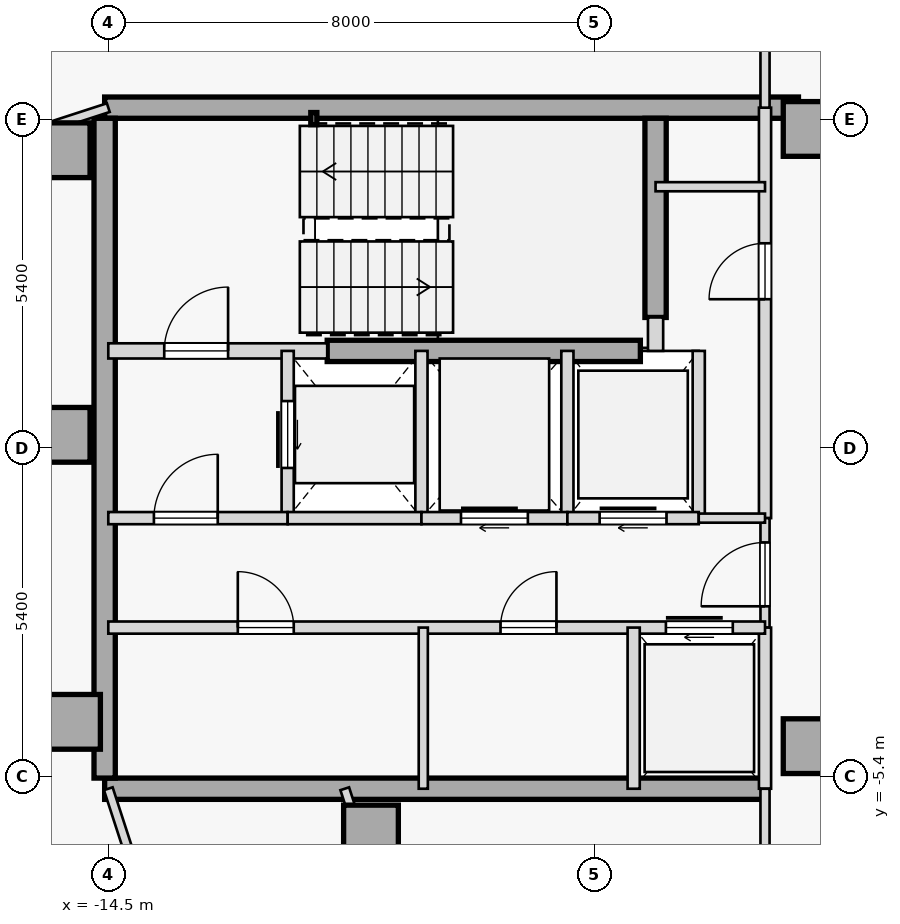
"""IFC4 building model, lengths in metres.
Left out: names, types, materials, properties, quantities, classifications, styles, units other than length and angle.
Written with IfcOpenShell. Run it as: python <this file> out.ifc"""

import sys

from ifc_helpers import new_model, si_unit, direction, frame, frame_2d, origin, origin_2d, place, context, subcontext, project, spatial, rectangle, hollow_rectangle, extrude, element, fill, save


model = new_model("IFC4")
c1 = context("Model", 3, precision=1e-05, world=origin(), true_north=direction((0.0, 1.0)))
c2 = subcontext(c1, "Body", "Model", "MODEL_VIEW")
j1 = project(units=[si_unit("LENGTHUNIT", "METRE"), si_unit("PLANEANGLEUNIT", "RADIAN")], contexts=[c1])
p1 = place(None, origin())
s1 = spatial("IfcSite", under=j1, at=p1, CompositionType="ELEMENT")
p2 = place(p1, origin())
s2 = spatial("IfcBuilding", under=s1, at=p2, CompositionType="ELEMENT")
p3 = place(p2, frame((0.0, 0.0, 241.05)))
s3 = spatial("IfcBuildingStorey", under=s2, at=p3, CompositionType="ELEMENT", Elevation=241.05)
for number, where, z_axis, x_axis in (
    (1, (-15.25, 4.9, 0.0), (0.0, 0.0, 1.0), (1.0, 0.0, 0.0)),
    (2, (-15.25, 0.22, 0.0), (0.0, 0.0, 1.0), (1.0, 0.0, 0.0)),
    (3, (-15.08, -4.5, 0.0), (0.0, 0.0, 1.0), (1.0, 0.0, 0.0)),
    (4, (-10.18, -6.32, 0.0), (0.0, 0.0, 1.0), (1.0, 0.0, 0.0)),
    (5, (-2.95, -4.9, 0.0), (0.0, 0.0, 1.0), (1.0, 0.0, 0.0)),
    (6, (-2.95, 5.25, 0.0), (0.0, 0.0, 1.0), (1.0, 0.0, 0.0)),
):
    element("IfcColumn", number, at=place(p3, frame(where, z_axis=z_axis, x_axis=x_axis)), inside=s3, PredefinedType="COLUMN", context=c2, shape_type="SweptSolid", body=[
        extrude(rectangle(XDim=0.9, YDim=0.9, at=origin_2d()), origin(), (0.0, 0.0, 1.0), 3.35),
    ])
p4 = place(p3, frame((-14.56, 5.6, 0.0), z_axis=(0.0, 0.0, 1.0), x_axis=(1.0, 0.0, 0.0)))
e7 = element("IfcWall", 7, at=p4, inside=s3, PredefinedType="SHEAR", context=c2, shape_type="SweptSolid", body=[
    extrude(rectangle(XDim=11.41, YDim=0.35, at=frame_2d((5.705, 0.0))), origin(), (0.0, 0.0, 1.0), 3.125),
])
p5 = place(p3, frame((-14.56, -5.6, 0.0), z_axis=(0.0, 0.0, 1.0), x_axis=(1.0, 0.0, 0.0)))
e8 = element("IfcWall", 8, at=p5, inside=s3, PredefinedType="SHEAR", context=c2, shape_type="SweptSolid", body=[
    extrude(rectangle(XDim=10.86, YDim=0.35, at=frame_2d((5.43, 0.0))), origin(), (0.0, 0.0, 1.0), 3.125),
])
p6 = place(p3, frame((-14.56, -5.425, 0.0), z_axis=(0.0, 0.0, 1.0), x_axis=(0.0, 1.0, 0.0)))
e9 = element("IfcWall", 9, at=p6, inside=s3, PredefinedType="SHEAR", context=c2, shape_type="SweptSolid", body=[
    extrude(rectangle(XDim=10.85, YDim=0.35, at=frame_2d((5.425, 0.0))), origin(), (0.0, 0.0, 1.0), 3.125),
])
p7 = place(p3, frame((-5.5, 2.15, 0.0), z_axis=(0.0, 0.0, 1.0), x_axis=(0.0, 1.0, 0.0)))
e10 = element("IfcWall", 10, at=p7, inside=s3, PredefinedType="SHEAR", context=c2, shape_type="SweptSolid", body=[
    extrude(rectangle(XDim=3.275, YDim=0.35, at=frame_2d((1.638, 0.0))), origin(), (0.0, 0.0, 1.0), 3.125),
])
p8 = place(p3, frame((-10.9, 1.6, 0.0), z_axis=(0.0, 0.0, 1.0), x_axis=(1.0, 0.0, 0.0)))
e11 = element("IfcWall", 11, at=p8, inside=s3, PredefinedType="SHEAR", context=c2, shape_type="SweptSolid", body=[
    extrude(rectangle(XDim=5.15, YDim=0.35, at=frame_2d((2.575, 0.0))), origin(), (0.0, 0.0, 1.0), 3.125),
])
p9 = place(p3, frame((-11.12, 5.42, 0.0), z_axis=(0.0, 0.0, 1.0), x_axis=(1.0, 0.0, 0.0)))
e12 = element("IfcColumn", 12, at=p9, inside=s3, PredefinedType="COLUMN", context=c2, shape_type="SweptSolid", body=[
    extrude(hollow_rectangle(XDim=0.1, YDim=0.2, WallThickness=0.008, at=origin_2d()), origin(), (0.0, 0.0, 1.0), 3.35),
])
p10 = place(p3, frame((-14.5, 1.6, 0.0), z_axis=(0.0, 0.0, 1.0), x_axis=(1.0, 0.0, 0.0)))
e13 = element("IfcWall", 13, at=p10, inside=s3, PredefinedType="STANDARD", context=c2, shape_type="SweptSolid", body=[
    extrude(rectangle(XDim=3.6, YDim=0.25, at=frame_2d((1.8, 0.0))), origin(), (0.0, 0.0, 1.0), 3.125),
])
p11 = place(p10, frame((0.92, 0.0, 0.0)))
e14 = element("IfcOpeningElement", 14, at=p11, cuts=e13, PredefinedType="OPENING", context=c2, shape_type="SweptSolid", body=[
    extrude(rectangle(XDim=1.05, YDim=2.15, at=frame_2d((0.525, 1.075))), frame((0.0, 0.135, 0.0), z_axis=(0.0, -1.0, 0.0), x_axis=(1.0, 0.0, 0.0)), (0.0, 0.0, 1.0), 0.27),
])
p12 = place(p3, frame((-5.5, 1.6, 0.0), z_axis=(0.0, 0.0, 1.0), x_axis=(0.0, 1.0, 0.0)))
e15 = element("IfcWall", 15, at=p12, inside=s3, PredefinedType="STANDARD", context=c2, shape_type="SweptSolid", body=[
    extrude(rectangle(XDim=0.55, YDim=0.25, at=frame_2d((0.275, 0.0))), origin(), (0.0, 0.0, 1.0), 3.125),
])
p13 = place(p3, frame((-3.7, -1.15, 0.0), z_axis=(0.0, 0.0, 1.0), x_axis=(0.0, 1.0, 0.0)))
e16 = element("IfcWall", 16, at=p13, inside=s3, PredefinedType="STANDARD", context=c2, shape_type="SweptSolid", body=[
    extrude(rectangle(XDim=6.75, YDim=0.2, at=frame_2d((3.375, 0.0))), origin(), (0.0, 0.0, 1.0), 3.125),
])
p14 = place(p13, frame((3.6, 0.0, 0.0)))
e17 = element("IfcOpeningElement", 17, at=p14, cuts=e16, PredefinedType="OPENING", context=c2, shape_type="SweptSolid", body=[
    extrude(rectangle(XDim=0.92, YDim=2.15, at=frame_2d((0.46, 1.075))), frame((0.0, 0.11, 0.0), z_axis=(0.0, -1.0, 0.0), x_axis=(1.0, 0.0, 0.0)), (0.0, 0.0, 1.0), 0.22),
])
p15 = place(p3, frame((-3.7, -2.95, 0.0), z_axis=(0.0, 0.0, 1.0), x_axis=(0.0, 1.0, 0.0)))
e18 = element("IfcWall", 18, at=p15, inside=s3, PredefinedType="PARTITIONING", context=c2, shape_type="SweptSolid", body=[
    extrude(rectangle(XDim=1.8, YDim=0.15, at=frame_2d((0.9, 0.0))), origin(), (0.0, 0.0, 1.0), 3.125),
])
p16 = place(p15, frame((0.35, 0.0, 0.0)))
e19 = element("IfcOpeningElement", 19, at=p16, cuts=e18, PredefinedType="OPENING", context=c2, shape_type="SweptSolid", body=[
    extrude(rectangle(XDim=1.05, YDim=2.18, at=frame_2d((0.525, 1.09))), frame((0.0, 0.085, 0.0), z_axis=(0.0, -1.0, 0.0), x_axis=(1.0, 0.0, 0.0)), (0.0, 0.0, 1.0), 0.17),
])
p17 = place(p3, frame((-3.7, -5.6, 0.0), z_axis=(0.0, 0.0, 1.0), x_axis=(0.0, 1.0, 0.0)))
e20 = element("IfcWall", 20, at=p17, inside=s3, PredefinedType="STANDARD", context=c2, shape_type="SweptSolid", body=[
    extrude(rectangle(XDim=2.65, YDim=0.2, at=frame_2d((1.325, 0.0))), origin(), (0.0, 0.0, 1.0), 3.125),
])
p18 = place(p3, frame((-11.55, -1.15, 0.0), z_axis=(0.0, 0.0, 1.0), x_axis=(0.0, 1.0, 0.0)))
e21 = element("IfcWall", 21, at=p18, inside=s3, PredefinedType="STANDARD", context=c2, shape_type="SweptSolid", body=[
    extrude(rectangle(XDim=2.75, YDim=0.2, at=frame_2d((1.375, 0.0))), origin(), (0.0, 0.0, 1.0), 3.125),
])
p19 = place(p18, frame((0.825, 0.0, 0.0)))
e22 = element("IfcOpeningElement", 22, at=p19, cuts=e21, PredefinedType="OPENING", context=c2, shape_type="SweptSolid", body=[
    extrude(rectangle(XDim=1.1, YDim=2.15, at=frame_2d((0.55, 1.075))), frame((0.0, 0.11, 0.0), z_axis=(0.0, -1.0, 0.0), x_axis=(1.0, 0.0, 0.0)), (0.0, 0.0, 1.0), 0.22),
])
p20 = place(p3, frame((-9.35, -1.15, 0.0), z_axis=(0.0, 0.0, 1.0), x_axis=(0.0, 1.0, 0.0)))
e23 = element("IfcWall", 23, at=p20, inside=s3, PredefinedType="STANDARD", context=c2, shape_type="SweptSolid", body=[
    extrude(rectangle(XDim=2.75, YDim=0.2, at=frame_2d((1.375, 0.0))), origin(), (0.0, 0.0, 1.0), 3.125),
])
p21 = place(p3, frame((-14.5, -1.15, 0.0), z_axis=(0.0, 0.0, 1.0), x_axis=(1.0, 0.0, 0.0)))
e24 = element("IfcWall", 24, at=p21, inside=s3, PredefinedType="STANDARD", context=c2, shape_type="SweptSolid", body=[
    extrude(rectangle(XDim=2.95, YDim=0.2, at=frame_2d((1.475, 0.0))), origin(), (0.0, 0.0, 1.0), 3.125),
])
p22 = place(p21, frame((0.75, 0.0, 0.0)))
e25 = element("IfcOpeningElement", 25, at=p22, cuts=e24, PredefinedType="OPENING", context=c2, shape_type="SweptSolid", body=[
    extrude(rectangle(XDim=1.05, YDim=2.18, at=frame_2d((0.525, 1.09))), frame((0.0, 0.11, 0.0), z_axis=(0.0, -1.0, 0.0), x_axis=(1.0, 0.0, 0.0)), (0.0, 0.0, 1.0), 0.22),
])
p23 = place(p3, frame((-11.55, -1.15, 0.0), z_axis=(0.0, 0.0, 1.0), x_axis=(1.0, 0.0, 0.0)))
e26 = element("IfcWall", 26, at=p23, inside=s3, PredefinedType="STANDARD", context=c2, shape_type="SweptSolid", body=[
    extrude(rectangle(XDim=2.2, YDim=0.2, at=frame_2d((1.1, 0.0))), origin(), (0.0, 0.0, 1.0), 3.125),
])
p24 = place(p3, frame((-6.95, -1.15, 0.0), z_axis=(0.0, 0.0, 1.0), x_axis=(0.0, 1.0, 0.0)))
e27 = element("IfcWall", 27, at=p24, inside=s3, PredefinedType="STANDARD", context=c2, shape_type="SweptSolid", body=[
    extrude(rectangle(XDim=2.75, YDim=0.2, at=frame_2d((1.375, 0.0))), origin(), (0.0, 0.0, 1.0), 3.125),
])
p25 = place(p3, frame((-9.35, -1.15, 0.0), z_axis=(0.0, 0.0, 1.0), x_axis=(1.0, 0.0, 0.0)))
e28 = element("IfcWall", 28, at=p25, inside=s3, PredefinedType="STANDARD", context=c2, shape_type="SweptSolid", body=[
    extrude(rectangle(XDim=2.4, YDim=0.2, at=frame_2d((1.2, 0.0))), origin(), (0.0, 0.0, 1.0), 3.125),
])
p26 = place(p25, frame((0.65, 0.0, 0.0)))
e29 = element("IfcOpeningElement", 29, at=p26, cuts=e28, PredefinedType="OPENING", context=c2, shape_type="SweptSolid", body=[
    extrude(rectangle(XDim=1.1, YDim=2.15, at=frame_2d((0.55, 1.075))), frame((0.0, 0.11, 0.0), z_axis=(0.0, -1.0, 0.0), x_axis=(1.0, 0.0, 0.0)), (0.0, 0.0, 1.0), 0.22),
])
p27 = place(p3, frame((-4.79, -1.15, 0.0), z_axis=(0.0, 0.0, 1.0), x_axis=(0.0, 1.0, 0.0)))
e30 = element("IfcWall", 30, at=p27, inside=s3, PredefinedType="STANDARD", context=c2, shape_type="SweptSolid", body=[
    extrude(rectangle(XDim=2.75, YDim=0.2, at=frame_2d((1.375, 0.0))), origin(), (0.0, 0.0, 1.0), 3.125),
])
p28 = place(p3, frame((-6.95, -1.15, 0.0), z_axis=(0.0, 0.0, 1.0), x_axis=(1.0, 0.0, 0.0)))
e31 = element("IfcWall", 31, at=p28, inside=s3, PredefinedType="STANDARD", context=c2, shape_type="SweptSolid", body=[
    extrude(rectangle(XDim=2.16, YDim=0.2, at=frame_2d((1.08, 0.0))), origin(), (0.0, 0.0, 1.0), 3.125),
])
p29 = place(p28, frame((0.53, 0.0, 0.0)))
e32 = element("IfcOpeningElement", 32, at=p29, cuts=e31, PredefinedType="OPENING", context=c2, shape_type="SweptSolid", body=[
    extrude(rectangle(XDim=1.1, YDim=2.15, at=frame_2d((0.55, 1.075))), frame((0.0, 0.11, 0.0), z_axis=(0.0, -1.0, 0.0), x_axis=(1.0, 0.0, 0.0)), (0.0, 0.0, 1.0), 0.22),
])
p30 = place(p3, frame((-4.79, -1.15, 0.0), z_axis=(0.0, 0.0, 1.0), x_axis=(1.0, 0.0, 0.0)))
e33 = element("IfcWall", 33, at=p30, inside=s3, PredefinedType="PARTITIONING", context=c2, shape_type="SweptSolid", body=[
    extrude(rectangle(XDim=1.09, YDim=0.15, at=frame_2d((0.545, 0.0))), origin(), (0.0, 0.0, 1.0), 3.125),
])
p31 = place(p3, frame((-14.5, -2.95, 0.0), z_axis=(0.0, 0.0, 1.0), x_axis=(1.0, 0.0, 0.0)))
e34 = element("IfcWall", 34, at=p31, inside=s3, PredefinedType="STANDARD", context=c2, shape_type="SweptSolid", body=[
    extrude(rectangle(XDim=10.8, YDim=0.2, at=frame_2d((5.4, 0.0))), origin(), (0.0, 0.0, 1.0), 3.125),
])
p32 = place(p31, frame((9.17, 0.0, 0.0)))
e35 = element("IfcOpeningElement", 35, at=p32, cuts=e34, PredefinedType="OPENING", context=c2, shape_type="SweptSolid", body=[
    extrude(rectangle(XDim=1.1, YDim=2.15, at=frame_2d((0.55, 1.075))), frame((0.0, 0.11, 0.0), z_axis=(0.0, -1.0, 0.0), x_axis=(1.0, 0.0, 0.0)), (0.0, 0.0, 1.0), 0.22),
])
p33 = place(p31, frame((2.13, 0.0, 0.0)))
e36 = element("IfcOpeningElement", 36, at=p33, cuts=e34, PredefinedType="OPENING", context=c2, shape_type="SweptSolid", body=[
    extrude(rectangle(XDim=0.92, YDim=2.15, at=frame_2d((0.46, 1.075))), frame((0.0, 0.11, 0.0), z_axis=(0.0, -1.0, 0.0), x_axis=(1.0, 0.0, 0.0)), (0.0, 0.0, 1.0), 0.22),
])
p34 = place(p31, frame((6.45, 0.0, 0.0)))
e37 = element("IfcOpeningElement", 37, at=p34, cuts=e34, PredefinedType="OPENING", context=c2, shape_type="SweptSolid", body=[
    extrude(rectangle(XDim=0.92, YDim=2.15, at=frame_2d((0.46, 1.075))), frame((0.0, 0.11, 0.0), z_axis=(0.0, -1.0, 0.0), x_axis=(1.0, 0.0, 0.0)), (0.0, 0.0, 1.0), 0.22),
])
p35 = place(p3, frame((-5.86, -5.6, 0.0), z_axis=(0.0, 0.0, 1.0), x_axis=(0.0, 1.0, 0.0)))
e38 = element("IfcWall", 38, at=p35, inside=s3, PredefinedType="STANDARD", context=c2, shape_type="SweptSolid", body=[
    extrude(rectangle(XDim=2.65, YDim=0.2, at=frame_2d((1.325, 0.0))), origin(), (0.0, 0.0, 1.0), 3.125),
])
p36 = place(p3, frame((-9.32, -5.6, 0.0), z_axis=(0.0, 0.0, 1.0), x_axis=(0.0, 1.0, 0.0)))
e39 = element("IfcWall", 39, at=p36, inside=s3, PredefinedType="PARTITIONING", context=c2, shape_type="SweptSolid", body=[
    extrude(rectangle(XDim=2.65, YDim=0.15, at=frame_2d((1.325, 0.0))), origin(), (0.0, 0.0, 1.0), 3.125),
])
p37 = place(p3, frame((-5.5, 4.3, 0.0), z_axis=(0.0, 0.0, 1.0), x_axis=(1.0, 0.0, 0.0)))
e40 = element("IfcWall", 40, at=p37, inside=s3, PredefinedType="PARTITIONING", context=c2, shape_type="SweptSolid", body=[
    extrude(rectangle(XDim=1.8, YDim=0.15, at=frame_2d((0.9, 0.0))), origin(), (0.0, 0.0, 1.0), 3.125),
])
p38 = place(p3, frame((-24.022, 4.21, 0.0), z_axis=(0.0, 0.0, 1.0), x_axis=(0.951058997127, 0.309009359055, 0.0)))
e41 = element("IfcWall", 41, at=p38, inside=s3, PredefinedType="PARTITIONING", context=c2, shape_type="SweptSolid", body=[
    extrude(rectangle(XDim=13.817, YDim=0.15, at=frame_2d((6.908, 0.0))), origin(), (0.0, 0.0, 1.0), 3.125),
])
p39 = place(p38, frame((6.434, 0.0, 0.0)))
e42 = element("IfcOpeningElement", 42, at=p39, cuts=e41, PredefinedType="OPENING", context=c2, shape_type="SweptSolid", body=[
    extrude(rectangle(XDim=0.95, YDim=2.15, at=frame_2d((0.475, 1.075))), frame((0.0, 0.085, 0.0), z_axis=(0.0, -1.0, 0.0), x_axis=(1.0, 0.0, 0.0)), (0.0, 0.0, 1.0), 0.17),
])
p40 = place(p3, frame((-3.7, -11.514, 0.0), z_axis=(0.0, 0.0, 1.0), x_axis=(-8.2572974e-05, 0.999999996591, 0.0)))
e43 = element("IfcWall", 43, at=p40, inside=s3, PredefinedType="PARTITIONING", context=c2, shape_type="SweptSolid", body=[
    extrude(rectangle(XDim=5.913, YDim=0.15, at=frame_2d((2.957, 0.0))), origin(), (0.0, 0.0, 1.0), 3.125),
])
p41 = place(p40, frame((2.497, 0.0, 0.0)))
e44 = element("IfcOpeningElement", 44, at=p41, cuts=e43, PredefinedType="OPENING", context=c2, shape_type="SweptSolid", body=[
    extrude(rectangle(XDim=0.92, YDim=2.15, at=frame_2d((0.46, 1.075))), frame((0.0, 0.085, 0.0), z_axis=(0.0, -1.0, 0.0), x_axis=(1.0, 0.0, 0.0)), (0.0, 0.0, 1.0), 0.17),
])
p42 = place(p3, frame((-17.792, 4.531, 0.0), z_axis=(0.0, 0.0, 1.0), x_axis=(0.951047546178, 0.309044600193, 0.0)))
e45 = element("IfcWall", 45, at=p42, inside=s3, PredefinedType="PARTITIONING", context=c2, shape_type="SweptSolid", body=[
    extrude(rectangle(XDim=3.461, YDim=0.15, at=frame_2d((1.73, 0.0))), origin(), (0.0, 0.0, 1.0), 3.125),
])
p43 = place(p42, frame((0.302, 0.0, 0.0)))
e46 = element("IfcOpeningElement", 46, at=p43, cuts=e45, PredefinedType="OPENING", context=c2, shape_type="SweptSolid", body=[
    extrude(rectangle(XDim=0.92, YDim=2.15, at=frame_2d((0.46, 1.075))), frame((0.0, 0.085, 0.0), z_axis=(0.0, -1.0, 0.0), x_axis=(1.0, 0.0, 0.0)), (0.0, 0.0, 1.0), 0.17),
])
p44 = place(p3, frame((-3.7, 5.6, 0.0), z_axis=(0.0, 0.0, 1.0), x_axis=(0.000139120755, 0.999999990323, 0.0)))
e47 = element("IfcWall", 47, at=p44, inside=s3, PredefinedType="PARTITIONING", context=c2, shape_type="SweptSolid", body=[
    extrude(rectangle(XDim=3.51, YDim=0.15, at=frame_2d((1.755, 0.0))), origin(), (0.0, 0.0, 1.0), 3.125),
])
p45 = place(p3, frame((-30.663, -9.757, 0.0), z_axis=(0.0, 0.0, 1.0), x_axis=(0.951058192995, 0.309011833974, 0.0)))
e48 = element("IfcWall", 48, at=p45, inside=s3, PredefinedType="PARTITIONING", context=c2, shape_type="SweptSolid", body=[
    extrude(rectangle(XDim=16.657, YDim=0.15, at=frame_2d((8.329, 0.0))), origin(), (0.0, 0.0, 1.0), 3.125),
])
p46 = place(p3, frame((-13.488, -8.713, 0.0), z_axis=(0.0, 0.0, 1.0), x_axis=(-0.309082700143, 0.951035164687, 0.0)))
e49 = element("IfcWall", 49, at=p46, inside=s3, PredefinedType="PARTITIONING", context=c2, shape_type="SweptSolid", body=[
    extrude(rectangle(XDim=3.274, YDim=0.15, at=frame_2d((1.637, 0.0))), origin(), (0.0, 0.0, 1.0), 3.125),
])
p47 = place(p3, frame((-8.213, -12.98, 0.0), z_axis=(0.0, 0.0, 1.0), x_axis=(-0.309017065592, 0.951056493155, 0.0)))
e50 = element("IfcWall", 50, at=p47, inside=s3, PredefinedType="PARTITIONING", context=c2, shape_type="SweptSolid", body=[
    extrude(rectangle(XDim=7.76, YDim=0.15, at=frame_2d((3.88, 0.0))), origin(), (0.0, 0.0, 1.0), 3.125),
])
p48 = place(p11, origin())
e51 = element("IfcDoor", 51, at=p48, inside=s3, OperationType="SINGLE_SWING_RIGHT", PredefinedType="DOOR", context=c2, shape_type="SweptSolid", body=[
    extrude(rectangle(XDim=1.05, YDim=2.15, at=frame_2d((0.525, 1.075))), frame((0.0, 0.025, 0.0), z_axis=(0.0, -1.0, 0.0), x_axis=(1.0, 0.0, 0.0)), (0.0, 0.0, 1.0), 0.05),
])
fill(e14, e51)
p49 = place(p22, origin())
e52 = element("IfcDoor", 52, at=p49, inside=s3, OperationType="SINGLE_SWING_RIGHT", PredefinedType="DOOR", context=c2, shape_type="SweptSolid", body=[
    extrude(rectangle(XDim=1.05, YDim=2.18, at=frame_2d((0.525, 1.09))), frame((0.0, 0.025, 0.0), z_axis=(0.0, -1.0, 0.0), x_axis=(1.0, 0.0, 0.0)), (0.0, 0.0, 1.0), 0.05),
])
fill(e25, e52)
p50 = place(p16, origin())
e53 = element("IfcDoor", 53, at=p50, inside=s3, OperationType="SINGLE_SWING_LEFT", PredefinedType="DOOR", context=c2, shape_type="SweptSolid", body=[
    extrude(rectangle(XDim=1.05, YDim=2.18, at=frame_2d((0.525, 1.09))), frame((0.0, 0.025, 0.0), z_axis=(0.0, -1.0, 0.0), x_axis=(1.0, 0.0, 0.0)), (0.0, 0.0, 1.0), 0.05),
])
fill(e19, e53)
p51 = place(p19, origin())
e54 = element("IfcDoor", 54, at=p51, inside=s3, OperationType="SLIDING_TO_RIGHT", PredefinedType="DOOR", context=c2, shape_type="SweptSolid", body=[
    extrude(rectangle(XDim=1.1, YDim=2.15, at=frame_2d((0.55, 1.075))), frame((0.0, 0.025, 0.0), z_axis=(0.0, -1.0, 0.0), x_axis=(1.0, 0.0, 0.0)), (0.0, 0.0, 1.0), 0.05),
])
fill(e22, e54)
p52 = place(p26, origin())
e55 = element("IfcDoor", 55, at=p52, inside=s3, OperationType="SLIDING_TO_RIGHT", PredefinedType="DOOR", context=c2, shape_type="SweptSolid", body=[
    extrude(rectangle(XDim=1.1, YDim=2.15, at=frame_2d((0.55, 1.075))), frame((0.0, 0.025, 0.0), z_axis=(0.0, -1.0, 0.0), x_axis=(1.0, 0.0, 0.0)), (0.0, 0.0, 1.0), 0.05),
])
fill(e29, e55)
p53 = place(p29, origin())
e56 = element("IfcDoor", 56, at=p53, inside=s3, OperationType="SLIDING_TO_RIGHT", PredefinedType="DOOR", context=c2, shape_type="SweptSolid", body=[
    extrude(rectangle(XDim=1.1, YDim=2.15, at=frame_2d((0.55, 1.075))), frame((0.0, 0.025, 0.0), z_axis=(0.0, -1.0, 0.0), x_axis=(1.0, 0.0, 0.0)), (0.0, 0.0, 1.0), 0.05),
])
fill(e32, e56)
p54 = place(p32, origin())
e57 = element("IfcDoor", 57, at=p54, inside=s3, OperationType="SLIDING_TO_RIGHT", PredefinedType="DOOR", context=c2, shape_type="SweptSolid", body=[
    extrude(rectangle(XDim=1.1, YDim=2.15, at=frame_2d((0.55, 1.075))), frame((0.0, 0.025, 0.0), z_axis=(0.0, -1.0, 0.0), x_axis=(1.0, 0.0, 0.0)), (0.0, 0.0, 1.0), 0.05),
])
fill(e35, e57)
p55 = place(p33, origin())
e58 = element("IfcDoor", 58, at=p55, inside=s3, OperationType="SINGLE_SWING_LEFT", PredefinedType="DOOR", context=c2, shape_type="SweptSolid", body=[
    extrude(rectangle(XDim=0.92, YDim=2.15, at=frame_2d((0.46, 1.075))), frame((0.0, 0.025, 0.0), z_axis=(0.0, -1.0, 0.0), x_axis=(1.0, 0.0, 0.0)), (0.0, 0.0, 1.0), 0.05),
])
fill(e36, e58)
p56 = place(p34, origin())
e59 = element("IfcDoor", 59, at=p56, inside=s3, OperationType="SINGLE_SWING_RIGHT", PredefinedType="DOOR", context=c2, shape_type="SweptSolid", body=[
    extrude(rectangle(XDim=0.92, YDim=2.15, at=frame_2d((0.46, 1.075))), frame((0.0, 0.025, 0.0), z_axis=(0.0, -1.0, 0.0), x_axis=(1.0, 0.0, 0.0)), (0.0, 0.0, 1.0), 0.05),
])
fill(e37, e59)
p57 = place(p14, origin())
e60 = element("IfcDoor", 60, at=p57, inside=s3, OperationType="SINGLE_SWING_LEFT", PredefinedType="DOOR", context=c2, shape_type="SweptSolid", body=[
    extrude(rectangle(XDim=0.92, YDim=2.15, at=frame_2d((0.46, 1.075))), frame((0.0, 0.025, 0.0), z_axis=(0.0, -1.0, 0.0), x_axis=(1.0, 0.0, 0.0)), (0.0, 0.0, 1.0), 0.05),
])
fill(e17, e60)
save(model, sys.argv[1])
